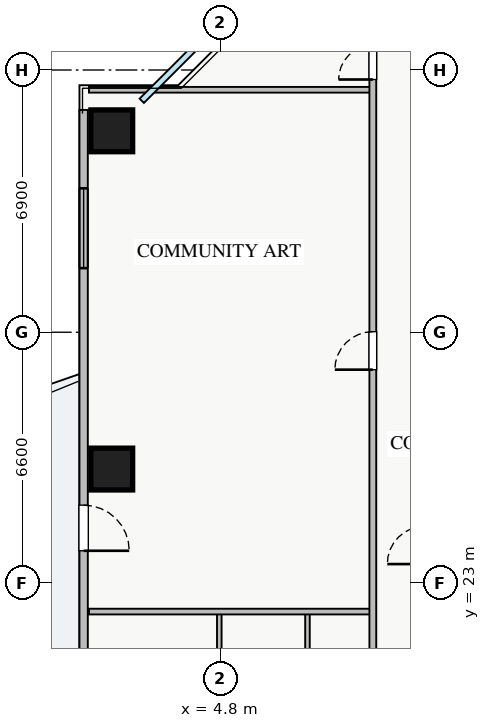
"""IFC4 building model, lengths in metres.
Left out: names, types, materials, properties, quantities, classifications, styles, units other than length and angle.
Written with IfcOpenShell. Run it as: python <this file> out.ifc"""

import sys

from ifc_helpers import new_model, si_unit, direction, frame, frame_2d, origin, origin_2d, place, context, subcontext, project, spatial, rectangle, extrude, source, transform, mapped, element, fill, save


model = new_model("IFC4")
c1 = context("Model", 3, precision=1e-05, world=origin(), true_north=direction((0.0, 1.0)))
c2 = subcontext(c1, "Body", "Model", "MODEL_VIEW")
j1 = project(units=[si_unit("LENGTHUNIT", "METRE"), si_unit("PLANEANGLEUNIT", "RADIAN")], contexts=[c1])
p1 = place(None, origin())
s1 = spatial("IfcSite", under=j1, at=p1, CompositionType="ELEMENT")
p2 = place(p1, origin())
s2 = spatial("IfcBuilding", under=s1, at=p2, CompositionType="ELEMENT")
p3 = place(p2, frame((0.0, 0.0, 100.25)))
s3 = spatial("IfcBuildingStorey", under=s2, at=p3, CompositionType="ELEMENT", Elevation=100.25)
m1 = source(origin(), c2, "Body", "SweptSolid", [
    extrude(rectangle(XDim=1.1, YDim=1.1, at=origin_2d()), origin(), (0.0, 0.0, 1.0), 3.25),
])
for number, where, z_axis, x_axis in (
    (1, (1.95, 34.9, 0.0), (0.0, 0.0, 1.0), (1.0, 0.0, 0.0)),
    (2, (1.95, 26.0, 0.0), (0.0, 0.0, 1.0), (1.0, 0.0, 0.0)),
):
    element("IfcColumn", number, at=place(p3, frame(where, z_axis=z_axis, x_axis=x_axis)), inside=s3, PredefinedType="COLUMN", context=c2, shape_type="MappedRepresentation", body=[
        mapped(m1, transform((0.0, 0.0, 0.0), x_axis=(1.0, 0.0, 0.0), y_axis=(0.0, 1.0, 0.0), z_axis=(0.0, 0.0, 1.0), scale=1.0)),
    ])
p4 = place(p3, frame((1.21, 10.55, 0.0), z_axis=(0.0, 0.0, 1.0), x_axis=(0.0, 1.0, 0.0)))
e3 = element("IfcWall", 3, at=p4, inside=s3, PredefinedType="STANDARD", context=c2, shape_type="SweptSolid", body=[
    extrude(rectangle(XDim=24.9, YDim=0.22, at=frame_2d((12.45, 0.0))), origin(), (0.0, 0.0, 1.0), 2.61),
])
p5 = place(p4, frame((13.3, 0.0, 0.0)))
e4 = element("IfcOpeningElement", 4, at=p5, cuts=e3, PredefinedType="OPENING", context=c2, shape_type="SweptSolid", body=[
    extrude(rectangle(XDim=1.2, YDim=2.1, at=frame_2d((0.6, 1.05))), frame((0.0, 0.12, 0.0), z_axis=(0.0, -1.0, 0.0), x_axis=(1.0, 0.0, 0.0)), (0.0, 0.0, 1.0), 0.24),
])
p6 = place(p4, frame((1.912, 0.0, 0.9)))
e5 = element("IfcOpeningElement", 5, at=p6, cuts=e3, PredefinedType="OPENING", context=c2, shape_type="SweptSolid", body=[
    extrude(rectangle(XDim=2.4, YDim=1.48, at=frame_2d((1.2, 0.74))), frame((0.0, 0.12, 0.0), z_axis=(0.0, -1.0, 0.0), x_axis=(1.0, 0.0, 0.0)), (0.0, 0.0, 1.0), 0.24),
])
p7 = place(p4, frame((20.737, 0.0, 0.9)))
e6 = element("IfcOpeningElement", 6, at=p7, cuts=e3, PredefinedType="OPENING", context=c2, shape_type="SweptSolid", body=[
    extrude(rectangle(XDim=2.1, YDim=1.48, at=frame_2d((1.05, 0.74))), frame((0.0, 0.12, 0.0), z_axis=(0.0, -1.0, 0.0), x_axis=(1.0, 0.0, 0.0)), (0.0, 0.0, 1.0), 0.24),
])
p8 = place(p4, frame((5.38, 0.0, 0.9)))
e7 = element("IfcOpeningElement", 7, at=p8, cuts=e3, PredefinedType="OPENING", context=c2, shape_type="SweptSolid", body=[
    extrude(rectangle(XDim=0.9, YDim=1.2, at=frame_2d((0.45, 0.6))), frame((0.0, 0.12, 0.0), z_axis=(0.0, -1.0, 0.0), x_axis=(1.0, 0.0, 0.0)), (0.0, 0.0, 1.0), 0.24),
])
p9 = place(p3, frame((1.35, 35.98, 0.0), z_axis=(0.0, 0.0, 1.0), x_axis=(1.0, 0.0, 0.0)))
e8 = element("IfcWall", 8, at=p9, inside=s3, PredefinedType="PARTITIONING", context=c2, shape_type="SweptSolid", body=[
    extrude(rectangle(XDim=7.47, YDim=0.15, at=frame_2d((3.735, 0.0))), origin(), (0.0, 0.0, 1.0), 3.07),
])
for number, where, z_axis, x_axis in (
    (9, (4.78, 15.71, 0.0), (0.0, 0.0, 1.0), (0.0, 1.0, 0.0)),
    (10, (7.1, 15.71, 0.0), (0.0, 0.0, 1.0), (0.0, 1.0, 0.0)),
):
    element("IfcWall", number, at=place(p3, frame(where, z_axis=z_axis, x_axis=x_axis)), inside=s3, PredefinedType="PLUMBINGWALL", context=c2, shape_type="SweptSolid", body=[
        extrude(rectangle(XDim=6.54, YDim=0.12, at=frame_2d((3.27, 0.0))), origin(), (0.0, 0.0, 1.0), 3.07),
    ])
p10 = place(p3, frame((1.35, 22.25, 0.0), z_axis=(0.0, 0.0, 1.0), x_axis=(1.0, 0.0, 0.0)))
e11 = element("IfcWall", 11, at=p10, inside=s3, PredefinedType="PARTITIONING", context=c2, shape_type="SweptSolid", body=[
    extrude(rectangle(XDim=7.47, YDim=0.15, at=frame_2d((3.735, 0.0))), origin(), (0.0, 0.0, 1.0), 3.07),
])
p11 = place(p3, frame((8.82, 8.31, 0.0), z_axis=(0.0, 0.0, 1.0), x_axis=(0.0, 1.0, 0.0)))
e12 = element("IfcWall", 12, at=p11, inside=s3, PredefinedType="PARTITIONING", context=c2, shape_type="SweptSolid", body=[
    extrude(rectangle(XDim=29.13, YDim=0.18, at=frame_2d((14.565, 0.0))), origin(), (0.0, 0.0, 1.0), 3.07),
])
p12 = place(p11, frame((27.94, 0.0, 0.0)))
e13 = element("IfcOpeningElement", 13, at=p12, cuts=e12, PredefinedType="OPENING", context=c2, shape_type="SweptSolid", body=[
    extrude(rectangle(XDim=0.9, YDim=2.05, at=frame_2d((0.45, 1.025))), frame((0.0, 0.1, 0.0), z_axis=(0.0, -1.0, 0.0), x_axis=(1.0, 0.0, 0.0)), (0.0, 0.0, 1.0), 0.2),
])
p13 = place(p11, frame((0.24, 0.0, 0.0)))
e14 = element("IfcOpeningElement", 14, at=p13, cuts=e12, PredefinedType="OPENING", context=c2, shape_type="SweptSolid", body=[
    extrude(rectangle(XDim=0.9, YDim=2.05, at=frame_2d((0.45, 1.025))), frame((0.0, 0.1, 0.0), z_axis=(0.0, -1.0, 0.0), x_axis=(1.0, 0.0, 0.0)), (0.0, 0.0, 1.0), 0.2),
])
p14 = place(p11, frame((3.69, 0.0, 0.0)))
e15 = element("IfcOpeningElement", 15, at=p14, cuts=e12, PredefinedType="OPENING", context=c2, shape_type="SweptSolid", body=[
    extrude(rectangle(XDim=1.0, YDim=2.05, at=frame_2d((0.5, 1.025))), frame((0.0, 0.1, 0.0), z_axis=(0.0, -1.0, 0.0), x_axis=(1.0, 0.0, 0.0)), (0.0, 0.0, 1.0), 0.2),
])
p15 = place(p11, frame((20.305, 0.0, 0.0)))
e16 = element("IfcOpeningElement", 16, at=p15, cuts=e12, PredefinedType="OPENING", context=c2, shape_type="SweptSolid", body=[
    extrude(rectangle(XDim=1.0, YDim=2.05, at=frame_2d((0.5, 1.025))), frame((0.0, 0.1, 0.0), z_axis=(0.0, -1.0, 0.0), x_axis=(1.0, 0.0, 0.0)), (0.0, 0.0, 1.0), 0.2),
])
m2 = source(origin(), c2, "Body", "SweptSolid", [
    extrude(rectangle(XDim=1.2, YDim=2.1, at=frame_2d((0.6, 1.05))), frame((0.0, 0.025, 0.0), z_axis=(0.0, -1.0, 0.0), x_axis=(1.0, 0.0, 0.0)), (0.0, 0.0, 1.0), 0.05),
])
p16 = place(p5, frame((1.2, 0.0, 0.0), z_axis=(0.0, 0.0, 1.0), x_axis=(-1.0, 0.0, 0.0)))
e17 = element("IfcDoor", 17, at=p16, inside=s3, OperationType="SINGLE_SWING_LEFT", PredefinedType="DOOR", context=c2, shape_type="MappedRepresentation", body=[
    mapped(m2, transform((0.0, 0.0, 0.0), x_axis=(1.0, 0.0, 0.0), y_axis=(0.0, 1.0, 0.0), z_axis=(0.0, 0.0, 1.0), scale=1.0)),
])
fill(e4, e17)
m3 = source(origin(), c2, "Body", "SweptSolid", [
    extrude(rectangle(XDim=2.1, YDim=1.48, at=frame_2d((1.05, 0.74))), frame((0.0, 0.03, 0.0), z_axis=(0.0, -1.0, 0.0), x_axis=(1.0, 0.0, 0.0)), (0.0, 0.0, 1.0), 0.06),
])
p17 = place(p7, origin())
e18 = element("IfcWindow", 18, at=p17, inside=s3, PartitioningType="TRIPLE_PANEL_VERTICAL", PredefinedType="WINDOW", context=c2, shape_type="MappedRepresentation", body=[
    mapped(m3, transform((0.0, 0.0, 0.0), x_axis=(1.0, 0.0, 0.0), y_axis=(0.0, 1.0, 0.0), z_axis=(0.0, 0.0, 1.0), scale=1.0)),
])
fill(e6, e18)
m4 = source(origin(), c2, "Body", "SweptSolid", [
    extrude(rectangle(XDim=0.9, YDim=2.05, at=frame_2d((0.45, 1.025))), frame((0.0, 0.025, 0.0), z_axis=(0.0, -1.0, 0.0), x_axis=(1.0, 0.0, 0.0)), (0.0, 0.0, 1.0), 0.05),
])
p18 = place(p12, origin())
e19 = element("IfcDoor", 19, at=p18, inside=s3, OperationType="SINGLE_SWING_LEFT", PredefinedType="DOOR", context=c2, shape_type="MappedRepresentation", body=[
    mapped(m4, transform((0.0, 0.0, 0.0), x_axis=(1.0, 0.0, 0.0), y_axis=(0.0, 1.0, 0.0), z_axis=(0.0, 0.0, 1.0), scale=1.0)),
])
fill(e13, e19)
m5 = source(origin(), c2, "Body", "SweptSolid", [
    extrude(rectangle(XDim=1.0, YDim=2.05, at=frame_2d((0.5, 1.025))), frame((0.0, 0.025, 0.0), z_axis=(0.0, -1.0, 0.0), x_axis=(1.0, 0.0, 0.0)), (0.0, 0.0, 1.0), 0.05),
])
p19 = place(p15, origin())
e20 = element("IfcDoor", 20, at=p19, inside=s3, OperationType="SINGLE_SWING_LEFT", PredefinedType="DOOR", context=c2, shape_type="MappedRepresentation", body=[
    mapped(m5, transform((0.0, 0.0, 0.0), x_axis=(1.0, 0.0, 0.0), y_axis=(0.0, 1.0, 0.0), z_axis=(0.0, 0.0, 1.0), scale=1.0)),
])
fill(e16, e20)
save(model, sys.argv[1])
